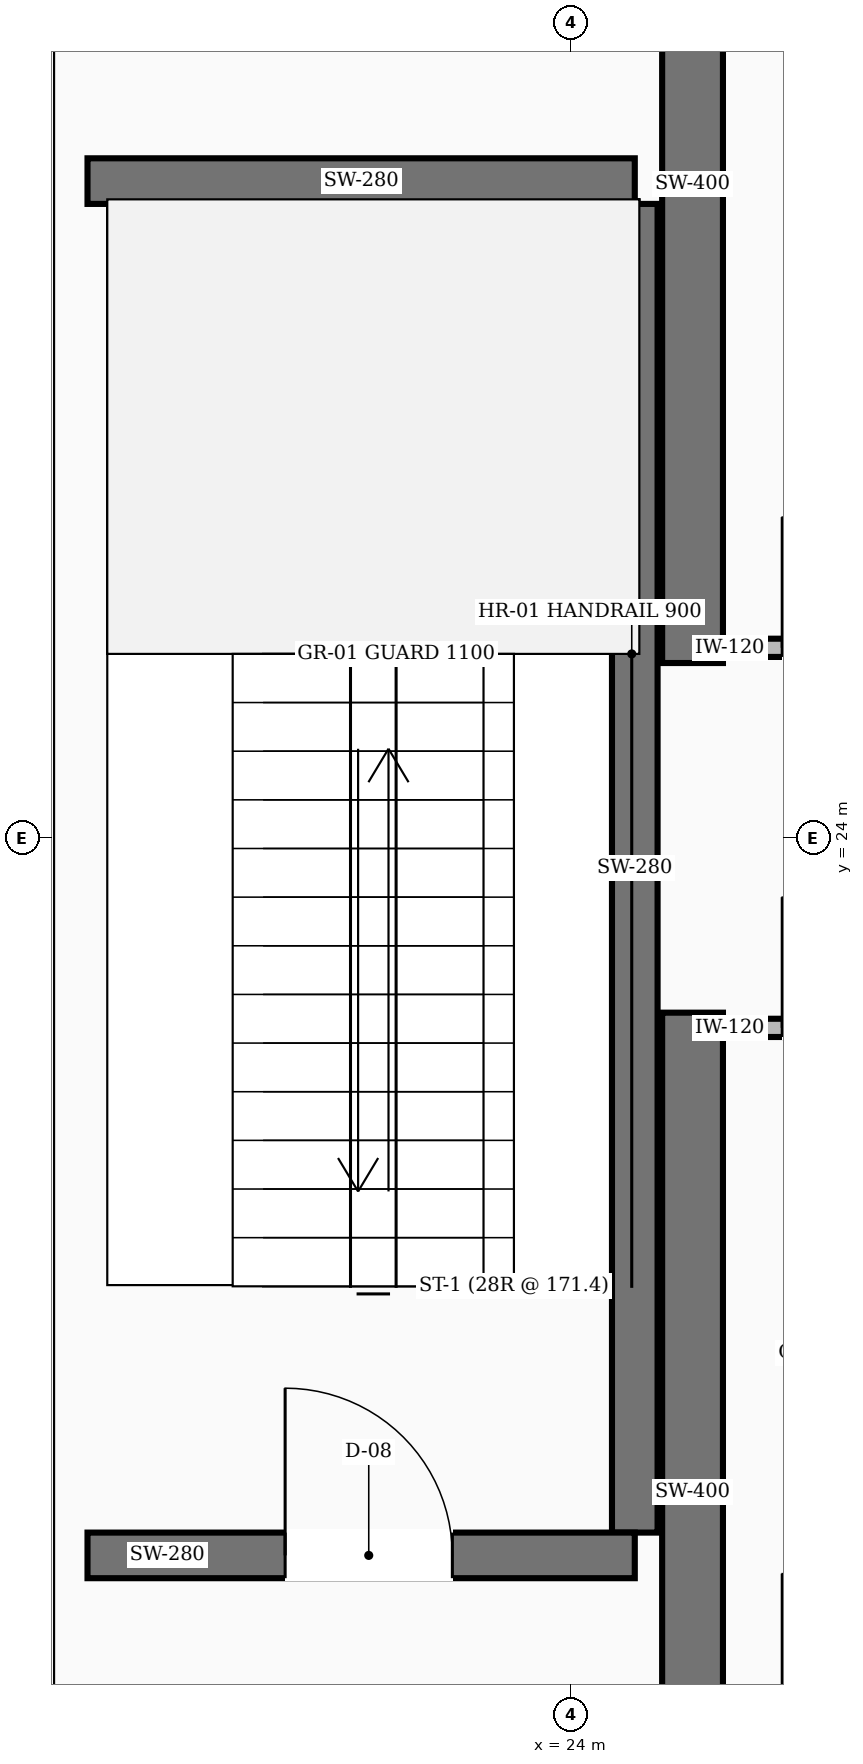
"""IFC4 building model, lengths in metres.
Left out: names, types, materials, properties, quantities, classifications, styles, units other than length and angle.
Written with IfcOpenShell. Run it as: python <this file> out.ifc"""

import sys

from ifc_helpers import new_model, si_unit, direction, frame, frame_2d, origin, place, context, subcontext, project, spatial, rectangle, extrude, element, fill, save


model = new_model("IFC4")
c1 = context("Model", 3, precision=1e-05, world=origin(), true_north=direction((0.0, 1.0)))
c2 = subcontext(c1, "Body", "Model", "MODEL_VIEW")
j1 = project(units=[si_unit("LENGTHUNIT", "METRE"), si_unit("PLANEANGLEUNIT", "RADIAN")], contexts=[c1])
p1 = place(None, origin())
s1 = spatial("IfcSite", under=j1, at=p1, CompositionType="ELEMENT")
p2 = place(p1, origin())
s2 = spatial("IfcBuilding", under=s1, at=p2, CompositionType="ELEMENT")
p3 = place(p2, frame((0.0, 0.0, 5.2)))
s3 = spatial("IfcBuildingStorey", under=s2, at=p3, CompositionType="ELEMENT", Elevation=5.2)
for number, where, z_axis, x_axis in (
    (1, (24.8, 16.55, 0.0), (0.0, 0.0, 1.0), (0.0, 1.0, 0.0)),
    (2, (24.8, 25.15, 0.0), (0.0, 0.0, 1.0), (0.0, 1.0, 0.0)),
):
    element("IfcWall", number, at=place(p3, frame(where, z_axis=z_axis, x_axis=x_axis)), inside=s3, PredefinedType="SHEAR", context=c2, shape_type="SweptSolid", body=[
        extrude(rectangle(XDim=6.3, YDim=0.4, at=frame_2d((3.15, 0.0))), origin(), (0.0, 0.0, 1.0), 4.8),
    ])
for number, where, z_axis, x_axis in (
    (3, (20.82, 19.43, 0.0), (0.0, 0.0, 1.0), (0.0, 1.0, 0.0)),
    (4, (24.42, 19.43, 0.0), (0.0, 0.0, 1.0), (0.0, 1.0, 0.0)),
):
    element("IfcWall", number, at=place(p3, frame(where, z_axis=z_axis, x_axis=x_axis)), inside=s3, PredefinedType="SHEAR", context=c2, shape_type="SweptSolid", body=[
        extrude(rectangle(XDim=8.74, YDim=0.3, at=frame_2d((4.37, 0.0))), origin(), (0.0, 0.0, 1.0), 4.8),
    ])
p4 = place(p3, frame((20.82, 19.28, 0.0), z_axis=(0.0, 0.0, 1.0), x_axis=(1.0, 0.0, 0.0)))
e5 = element("IfcWall", 5, at=p4, inside=s3, PredefinedType="SHEAR", context=c2, shape_type="SweptSolid", body=[
    extrude(rectangle(XDim=3.6, YDim=0.3, at=frame_2d((1.8, 0.0))), origin(), (0.0, 0.0, 1.0), 4.8),
])
p5 = place(p4, frame((1.3, 0.0, 0.0)))
e6 = element("IfcOpeningElement", 6, at=p5, cuts=e5, PredefinedType="OPENING", context=c2, shape_type="SweptSolid", body=[
    extrude(rectangle(XDim=1.1, YDim=2.1, at=frame_2d((0.55, 1.05))), frame((0.0, 0.16, 0.0), z_axis=(0.0, -1.0, 0.0), x_axis=(1.0, 0.0, 0.0)), (0.0, 0.0, 1.0), 0.32),
])
p6 = place(p3, frame((20.82, 28.32, 0.0), z_axis=(0.0, 0.0, 1.0), x_axis=(1.0, 0.0, 0.0)))
e7 = element("IfcWall", 7, at=p6, inside=s3, PredefinedType="SHEAR", context=c2, shape_type="SweptSolid", body=[
    extrude(rectangle(XDim=3.6, YDim=0.3, at=frame_2d((1.8, 0.0))), origin(), (0.0, 0.0, 1.0), 4.8),
])
p7 = place(p3, frame((20.82, 16.55, 0.0), z_axis=(0.0, 0.0, 1.0), x_axis=(0.0, 1.0, 0.0)))
e8 = element("IfcWall", 8, at=p7, inside=s3, PredefinedType="SOLIDWALL", context=c2, shape_type="SweptSolid", body=[
    extrude(rectangle(XDim=2.73, YDim=0.2, at=frame_2d((1.365, 0.0))), origin(), (0.0, 0.0, 1.0), 3.52),
])
p8 = place(p7, frame((0.815, 0.0, 0.0)))
e9 = element("IfcOpeningElement", 9, at=p8, cuts=e8, PredefinedType="OPENING", context=c2, shape_type="SweptSolid", body=[
    extrude(rectangle(XDim=1.1, YDim=2.1, at=frame_2d((0.55, 1.05))), frame((0.0, 0.11, 0.0), z_axis=(0.0, -1.0, 0.0), x_axis=(1.0, 0.0, 0.0)), (0.0, 0.0, 1.0), 0.22),
])
p9 = place(p3, frame((20.82, 28.32, 0.0), z_axis=(0.0, 0.0, 1.0), x_axis=(0.0, 1.0, 0.0)))
e10 = element("IfcWall", 10, at=p9, inside=s3, PredefinedType="SOLIDWALL", context=c2, shape_type="SweptSolid", body=[
    extrude(rectangle(XDim=3.13, YDim=0.2, at=frame_2d((1.565, 0.0))), origin(), (0.0, 0.0, 1.0), 3.52),
])
p10 = place(p9, frame((1.09, 0.0, 0.0)))
e11 = element("IfcOpeningElement", 11, at=p10, cuts=e10, PredefinedType="OPENING", context=c2, shape_type="SweptSolid", body=[
    extrude(rectangle(XDim=0.95, YDim=2.1, at=frame_2d((0.475, 1.05))), frame((0.0, 0.11, 0.0), z_axis=(0.0, -1.0, 0.0), x_axis=(1.0, 0.0, 0.0)), (0.0, 0.0, 1.0), 0.22),
])
p11 = place(p3, frame((24.95, 25.25, 0.0), z_axis=(0.0, 0.0, 1.0), x_axis=(1.0, 0.0, 0.0)))
e12 = element("IfcWall", 12, at=p11, inside=s3, PredefinedType="PARTITIONING", context=c2, shape_type="SweptSolid", body=[
    extrude(rectangle(XDim=3.2, YDim=0.12, at=frame_2d((1.6, 0.0))), origin(), (0.0, 0.0, 1.0), 3.52),
])
p12 = place(p11, frame((1.125, 0.0, 0.0)))
e13 = element("IfcOpeningElement", 13, at=p12, cuts=e12, PredefinedType="OPENING", context=c2, shape_type="SweptSolid", body=[
    extrude(rectangle(XDim=0.95, YDim=2.1, at=frame_2d((0.475, 1.05))), frame((0.0, 0.07, 0.0), z_axis=(0.0, -1.0, 0.0), x_axis=(1.0, 0.0, 0.0)), (0.0, 0.0, 1.0), 0.14),
])
p13 = place(p3, frame((24.95, 22.75, 0.0), z_axis=(0.0, 0.0, 1.0), x_axis=(1.0, 0.0, 0.0)))
e14 = element("IfcWall", 14, at=p13, inside=s3, PredefinedType="PARTITIONING", context=c2, shape_type="SweptSolid", body=[
    extrude(rectangle(XDim=3.2, YDim=0.12, at=frame_2d((1.6, 0.0))), origin(), (0.0, 0.0, 1.0), 3.52),
])
p14 = place(p13, frame((1.125, 0.0, 0.0)))
e15 = element("IfcOpeningElement", 15, at=p14, cuts=e14, PredefinedType="OPENING", context=c2, shape_type="SweptSolid", body=[
    extrude(rectangle(XDim=0.95, YDim=2.1, at=frame_2d((0.475, 1.05))), frame((0.0, 0.07, 0.0), z_axis=(0.0, -1.0, 0.0), x_axis=(1.0, 0.0, 0.0)), (0.0, 0.0, 1.0), 0.14),
])
p15 = place(p5, origin())
e16 = element("IfcDoor", 16, at=p15, inside=s3, OperationType="SINGLE_SWING_LEFT", PredefinedType="DOOR", context=c2, shape_type="SweptSolid", body=[
    extrude(rectangle(XDim=1.1, YDim=2.1, at=frame_2d((0.55, 1.05))), frame((0.0, 0.025, 0.0), z_axis=(0.0, -1.0, 0.0), x_axis=(1.0, 0.0, 0.0)), (0.0, 0.0, 1.0), 0.05),
])
fill(e6, e16)
p16 = place(p8, origin())
e17 = element("IfcDoor", 17, at=p16, inside=s3, OperationType="SINGLE_SWING_LEFT", PredefinedType="DOOR", context=c2, shape_type="SweptSolid", body=[
    extrude(rectangle(XDim=1.1, YDim=2.1, at=frame_2d((0.55, 1.05))), frame((0.0, 0.025, 0.0), z_axis=(0.0, -1.0, 0.0), x_axis=(1.0, 0.0, 0.0)), (0.0, 0.0, 1.0), 0.05),
])
fill(e9, e17)
save(model, sys.argv[1])
